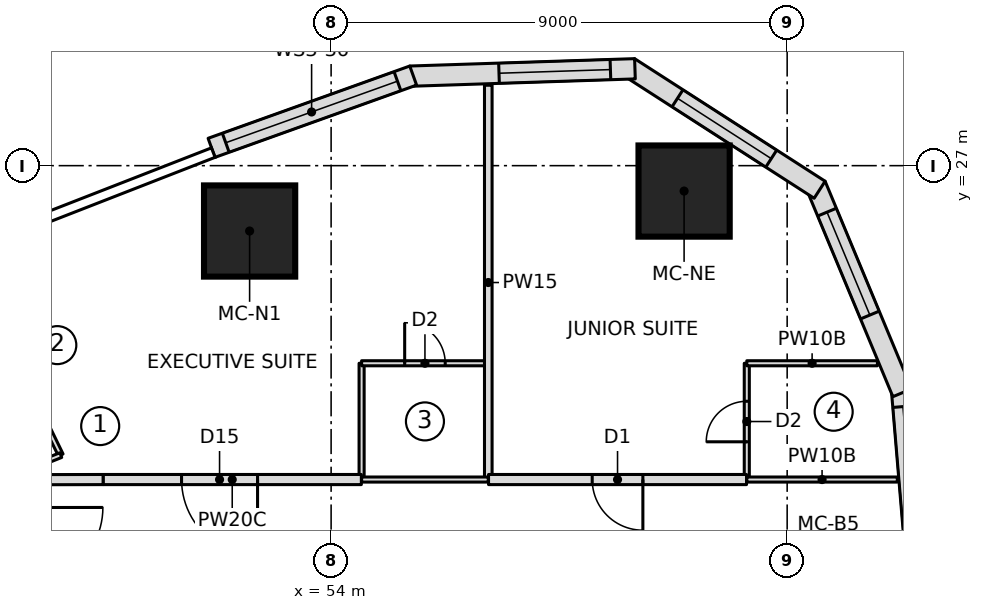
"""IFC4 building model, lengths in metres.
Left out: names, types, materials, properties, quantities, classifications, styles, units other than length and angle.
Written with IfcOpenShell. Run it as: python <this file> out.ifc"""

import sys

from ifc_helpers import new_model, si_unit, direction, frame, frame_2d, origin, origin_2d, place, context, subcontext, project, spatial, polyline, rectangle, outline, extrude, element, fill, save


model = new_model("IFC4")
c1 = context("Model", 3, precision=1e-05, world=origin(), true_north=direction((0.0, 1.0)))
c2 = subcontext(c1, "Body", "Model", "MODEL_VIEW")
j1 = project(units=[si_unit("LENGTHUNIT", "METRE"), si_unit("PLANEANGLEUNIT", "RADIAN")], contexts=[c1])
p1 = place(None, origin())
s1 = spatial("IfcSite", under=j1, at=p1, CompositionType="ELEMENT")
p2 = place(p1, origin())
s2 = spatial("IfcBuilding", under=s1, at=p2, CompositionType="ELEMENT")
p3 = place(p2, frame((0.0, 0.0, 53.8)))
s3 = spatial("IfcBuildingStorey", under=s2, at=p3, CompositionType="ELEMENT", Elevation=53.8)
for number, where, z_axis, x_axis in (
    (1, (60.966, 26.499, 0.0), (0.0, 0.0, 1.0), (1.0, 0.0, 0.0)),
    (2, (52.392, 25.71, 0.0), (0.0, 0.0, 1.0), (1.0, 0.0, 0.0)),
):
    element("IfcColumn", number, at=place(p3, frame(where, z_axis=z_axis, x_axis=x_axis)), inside=s3, PredefinedType="COLUMN", context=c2, shape_type="SweptSolid", body=[
        extrude(rectangle(XDim=1.8, YDim=1.8, at=origin_2d()), origin(), (0.0, 0.0, 1.0), 3.55),
    ])
p4 = place(p3, frame((65.603, 18.455, 0.0), z_axis=(0.0, 0.0, 1.0), x_axis=(-0.083793550906, 0.996483136248, 0.0)))
e3 = element("IfcWall", 3, at=p4, inside=s3, PredefinedType="NOTDEFINED", context=c2, shape_type="SweptSolid", body=[
    extrude(outline(polyline([(-0.002, -0.2), (4.136, -0.2), (4.074, 0.2), (0.002, 0.2), (-0.002, -0.2)])), origin(), (0.0, 0.0, 1.0), 3.25),
])
p5 = place(p4, frame((0.302, 0.0, 0.9)))
e4 = element("IfcOpeningElement", 4, at=p5, cuts=e3, PredefinedType="OPENING", context=c2, shape_type="SweptSolid", body=[
    extrude(rectangle(XDim=3.5, YDim=1.8, at=frame_2d((1.75, 0.9))), frame((0.0, 0.21, 0.0), z_axis=(0.0, -1.0, 0.0), x_axis=(1.0, 0.0, 0.0)), (0.0, 0.0, 1.0), 0.42),
])
p6 = place(p3, frame((65.259, 22.546, 0.0), z_axis=(0.0, 0.0, 1.0), x_axis=(-0.384372042685, 0.923178277908, 0.0)))
e5 = element("IfcWall", 5, at=p6, inside=s3, PredefinedType="NOTDEFINED", context=c2, shape_type="SweptSolid", body=[
    extrude(outline(polyline([(-0.031, -0.2), (4.408, -0.2), (4.283, 0.2), (0.031, 0.2), (-0.031, -0.2)])), origin(), (0.0, 0.0, 1.0), 3.25),
])
p7 = place(p6, frame((1.631, 0.0, 0.6)))
e6 = element("IfcOpeningElement", 6, at=p7, cuts=e5, PredefinedType="OPENING", context=c2, shape_type="SweptSolid", body=[
    extrude(outline(polyline([(0.0, 1.35), (0.084, 1.771), (0.322, 2.128), (0.679, 2.366), (1.1, 2.45), (1.521, 2.366), (1.878, 2.128), (2.116, 1.771), (2.2, 1.35), (2.2, 1.1), (2.116, 0.679), (1.878, 0.322), (1.521, 0.084), (1.1, 0.0), (0.679, 0.084), (0.322, 0.322), (0.084, 0.679), (0.0, 1.1), (0.0, 1.35)])), frame((0.0, 0.21, 0.0), z_axis=(0.0, -1.0, 0.0), x_axis=(1.0, 0.0, 0.0)), (0.0, 0.0, 1.0), 0.42),
])
p8 = place(p3, frame((63.588, 26.558, 0.0), z_axis=(0.0, 0.0, 1.0), x_axis=(-0.840937468718, 0.541132307025, 0.0)))
e7 = element("IfcWall", 7, at=p8, inside=s3, PredefinedType="NOTDEFINED", context=c2, shape_type="SweptSolid", body=[
    extrude(outline(polyline([(-0.062, -0.2), (4.409, -0.2), (4.284, 0.2), (0.062, 0.2), (-0.062, -0.2)])), origin(), (0.0, 0.0, 1.0), 3.25),
])
p9 = place(p8, frame((1.073, 0.0, 0.6)))
e8 = element("IfcOpeningElement", 8, at=p9, cuts=e7, PredefinedType="OPENING", context=c2, shape_type="SweptSolid", body=[
    extrude(outline(polyline([(0.0, 1.35), (0.084, 1.771), (0.322, 2.128), (0.679, 2.366), (1.1, 2.45), (1.521, 2.366), (1.878, 2.128), (2.116, 1.771), (2.2, 1.35), (2.2, 1.1), (2.116, 0.679), (1.878, 0.322), (1.521, 0.084), (1.1, 0.0), (0.679, 0.084), (0.322, 0.322), (0.084, 0.679), (0.0, 1.1), (0.0, 1.35)])), frame((0.0, 0.21, 0.0), z_axis=(0.0, -1.0, 0.0), x_axis=(1.0, 0.0, 0.0)), (0.0, 0.0, 1.0), 0.42),
])
p10 = place(p3, frame((59.934, 28.91, 0.0), z_axis=(0.0, 0.0, 1.0), x_axis=(-0.999463576228, -0.032749958686, 0.0)))
e9 = element("IfcWall", 9, at=p10, inside=s3, PredefinedType="NOTDEFINED", context=c2, shape_type="SweptSolid", body=[
    extrude(outline(polyline([(-0.062, -0.2), (4.378, -0.2), (4.315, 0.2), (0.062, 0.2), (-0.062, -0.2)])), origin(), (0.0, 0.0, 1.0), 3.25),
])
p11 = place(p10, frame((0.422, 0.0, 0.6)))
e10 = element("IfcOpeningElement", 10, at=p11, cuts=e9, PredefinedType="OPENING", context=c2, shape_type="SweptSolid", body=[
    extrude(outline(polyline([(0.0, 1.35), (0.084, 1.771), (0.322, 2.128), (0.679, 2.366), (1.1, 2.45), (1.521, 2.366), (1.878, 2.128), (2.116, 1.771), (2.2, 1.35), (2.2, 1.1), (2.116, 0.679), (1.878, 0.322), (1.521, 0.084), (1.1, 0.0), (0.679, 0.084), (0.322, 0.322), (0.084, 0.679), (0.0, 1.1), (0.0, 1.35)])), frame((0.0, 0.21, 0.0), z_axis=(0.0, -1.0, 0.0), x_axis=(1.0, 0.0, 0.0)), (0.0, 0.0, 1.0), 0.42),
])
p12 = place(p3, frame((55.59, 28.768, 0.0), z_axis=(0.0, 0.0, 1.0), x_axis=(-0.941339752885, -0.337460323057, 0.0)))
e11 = element("IfcWall", 11, at=p12, inside=s3, PredefinedType="NOTDEFINED", context=c2, shape_type="SweptSolid", body=[
    extrude(outline(polyline([(-0.031, -0.2), (4.196, -0.2), (4.196, 0.2), (0.031, 0.2), (-0.031, -0.2)])), origin(), (0.0, 0.0, 1.0), 3.25),
])
p13 = place(p12, frame((0.298, 0.0, 0.9)))
e12 = element("IfcOpeningElement", 12, at=p13, cuts=e11, PredefinedType="OPENING", context=c2, shape_type="SweptSolid", body=[
    extrude(rectangle(XDim=3.6, YDim=1.8, at=frame_2d((1.8, 0.9))), frame((0.0, 0.21, 0.0), z_axis=(0.0, -1.0, 0.0), x_axis=(1.0, 0.0, 0.0)), (0.0, 0.0, 1.0), 0.42),
])
p14 = place(p3, frame((54.602, 20.8, 0.0), z_axis=(0.0, 0.0, 1.0), x_axis=(0.0, 1.0, 0.0)))
e13 = element("IfcWall", 13, at=p14, inside=s3, PredefinedType="PARTITIONING", context=c2, shape_type="SweptSolid", body=[
    extrude(rectangle(XDim=2.3, YDim=0.1, at=frame_2d((1.15, 0.0))), origin(), (0.0, 0.0, 1.0), 3.25),
])
p15 = place(p3, frame((54.602, 23.1, 0.0), z_axis=(0.0, 0.0, 1.0), x_axis=(1.0, 0.0, 0.0)))
e14 = element("IfcWall", 14, at=p15, inside=s3, PredefinedType="PARTITIONING", context=c2, shape_type="SweptSolid", body=[
    extrude(rectangle(XDim=2.5, YDim=0.1, at=frame_2d((1.25, 0.0))), origin(), (0.0, 0.0, 1.0), 3.25),
])
p16 = place(p15, frame((0.85, 0.0, 0.0)))
e15 = element("IfcOpeningElement", 15, at=p16, cuts=e14, PredefinedType="OPENING", context=c2, shape_type="SweptSolid", body=[
    extrude(rectangle(XDim=0.8, YDim=2.1, at=frame_2d((0.4, 1.05))), frame((0.0, 0.06, 0.0), z_axis=(0.0, -1.0, 0.0), x_axis=(1.0, 0.0, 0.0)), (0.0, 0.0, 1.0), 0.12),
])
p17 = place(p3, frame((62.203, 20.8, 0.0), z_axis=(0.0, 0.0, 1.0), x_axis=(0.0, 1.0, 0.0)))
e16 = element("IfcWall", 16, at=p17, inside=s3, PredefinedType="PARTITIONING", context=c2, shape_type="SweptSolid", body=[
    extrude(rectangle(XDim=2.3, YDim=0.1, at=frame_2d((1.15, 0.0))), origin(), (0.0, 0.0, 1.0), 3.25),
])
p18 = place(p17, frame((0.75, 0.0, 0.0)))
e17 = element("IfcOpeningElement", 17, at=p18, cuts=e16, PredefinedType="OPENING", context=c2, shape_type="SweptSolid", body=[
    extrude(rectangle(XDim=0.8, YDim=2.1, at=frame_2d((0.4, 1.05))), frame((0.0, 0.06, 0.0), z_axis=(0.0, -1.0, 0.0), x_axis=(1.0, 0.0, 0.0)), (0.0, 0.0, 1.0), 0.12),
])
p19 = place(p3, frame((62.203, 23.1, 0.0), z_axis=(0.0, 0.0, 1.0), x_axis=(1.0, 0.0, 0.0)))
e18 = element("IfcWall", 18, at=p19, inside=s3, PredefinedType="PARTITIONING", context=c2, shape_type="SweptSolid", body=[
    extrude(rectangle(XDim=2.578, YDim=0.1, at=frame_2d((1.289, 0.0))), origin(), (0.0, 0.0, 1.0), 3.25),
])
p20 = place(p3, frame((57.102, 20.8, 0.0), z_axis=(0.0, 0.0, 1.0), x_axis=(0.0, 1.0, 0.0)))
e19 = element("IfcWall", 19, at=p20, inside=s3, PredefinedType="PARTITIONING", context=c2, shape_type="SweptSolid", body=[
    extrude(rectangle(XDim=7.787, YDim=0.15, at=frame_2d((3.894, 0.0))), origin(), (0.0, 0.0, 1.0), 3.25),
])
p21 = place(p3, frame((47.655, 23.361, 0.0), z_axis=(0.0, 0.0, 1.0), x_axis=(0.438171240168, -0.898891519756, 0.0)))
e20 = element("IfcWall", 20, at=p21, inside=s3, PredefinedType="PARTITIONING", context=c2, shape_type="SweptSolid", body=[
    extrude(rectangle(XDim=2.306, YDim=0.1, at=frame_2d((1.153, 0.0))), origin(), (0.0, 0.0, 1.0), 3.25),
])
p22 = place(p3, frame((48.665, 21.288, 0.0), z_axis=(0.0, 0.0, 1.0), x_axis=(-0.928288495333, -0.371860819975, 0.0)))
e21 = element("IfcWall", 21, at=p22, inside=s3, PredefinedType="PARTITIONING", context=c2, shape_type="SweptSolid", body=[
    extrude(rectangle(XDim=2.507, YDim=0.1, at=frame_2d((1.253, 0.0))), origin(), (0.0, 0.0, 1.0), 3.25),
])
p23 = place(p22, frame((1.25, 0.0, 0.0)))
e22 = element("IfcOpeningElement", 22, at=p23, cuts=e21, PredefinedType="OPENING", context=c2, shape_type="SweptSolid", body=[
    extrude(rectangle(XDim=0.8, YDim=2.1, at=frame_2d((0.4, 1.05))), frame((0.0, 0.06, 0.0), z_axis=(0.0, -1.0, 0.0), x_axis=(1.0, 0.0, 0.0)), (0.0, 0.0, 1.0), 0.12),
])
p24 = place(p3, frame((54.597, 20.805, 0.0), z_axis=(0.0, 0.0, 1.0), x_axis=(-1.0, 0.0, 0.0)))
e23 = element("IfcWall", 23, at=p24, inside=s3, PredefinedType="PARTITIONING", context=c2, shape_type="SweptSolid", body=[
    extrude(rectangle(XDim=5.097, YDim=0.2, at=frame_2d((2.548, 0.0))), origin(), (0.0, 0.0, 1.0), 3.25),
])
p25 = place(p24, frame((2.048, 0.0, 0.0)))
e24 = element("IfcOpeningElement", 24, at=p25, cuts=e23, PredefinedType="OPENING", context=c2, shape_type="SweptSolid", body=[
    extrude(rectangle(XDim=1.5, YDim=2.1, at=frame_2d((0.75, 1.05))), frame((0.0, 0.11, 0.0), z_axis=(0.0, -1.0, 0.0), x_axis=(1.0, 0.0, 0.0)), (0.0, 0.0, 1.0), 0.22),
])
p26 = place(p3, frame((62.198, 20.805, 0.0), z_axis=(0.0, 0.0, 1.0), x_axis=(-1.0, 0.0, 0.0)))
e25 = element("IfcWall", 25, at=p26, inside=s3, PredefinedType="PARTITIONING", context=c2, shape_type="SweptSolid", body=[
    extrude(rectangle(XDim=5.092, YDim=0.2, at=frame_2d((2.546, 0.0))), origin(), (0.0, 0.0, 1.0), 3.25),
])
p27 = place(p26, frame((2.046, 0.0, 0.0)))
e26 = element("IfcOpeningElement", 26, at=p27, cuts=e25, PredefinedType="OPENING", context=c2, shape_type="SweptSolid", body=[
    extrude(rectangle(XDim=1.0, YDim=2.1, at=frame_2d((0.5, 1.05))), frame((0.0, 0.11, 0.0), z_axis=(0.0, -1.0, 0.0), x_axis=(1.0, 0.0, 0.0)), (0.0, 0.0, 1.0), 0.22),
])
p28 = place(p3, frame((57.102, 20.805, 0.0), z_axis=(0.0, 0.0, 1.0), x_axis=(-1.0, 0.0, 0.0)))
e27 = element("IfcWall", 27, at=p28, inside=s3, PredefinedType="PARTITIONING", context=c2, shape_type="SweptSolid", body=[
    extrude(rectangle(XDim=2.5, YDim=0.1, at=frame_2d((1.25, 0.0))), origin(), (0.0, 0.0, 1.0), 3.25),
])
p29 = place(p3, frame((65.175, 20.805, 0.0), z_axis=(0.0, 0.0, 1.0), x_axis=(-1.0, 0.0, 0.0)))
e28 = element("IfcWall", 28, at=p29, inside=s3, PredefinedType="PARTITIONING", context=c2, shape_type="SweptSolid", body=[
    extrude(rectangle(XDim=2.971, YDim=0.1, at=frame_2d((1.486, 0.0))), origin(), (0.0, 0.0, 1.0), 3.25),
])
p30 = place(p3, frame((49.5, 20.805, 0.0), z_axis=(0.0, 0.0, 1.0), x_axis=(-0.999998104399, -0.001947099992, 0.0)))
e29 = element("IfcWall", 29, at=p30, inside=s3, PredefinedType="PARTITIONING", context=c2, shape_type="SweptSolid", body=[
    extrude(rectangle(XDim=1.505, YDim=0.2, at=frame_2d((0.752, 0.0))), origin(), (0.0, 0.0, 1.0), 3.25),
])
p31 = place(p5, origin())
e30 = element("IfcWindow", 30, at=p31, inside=s3, PartitioningType="SINGLE_PANEL", PredefinedType="WINDOW", context=c2, shape_type="SweptSolid", body=[
    extrude(rectangle(XDim=3.5, YDim=1.8, at=frame_2d((1.75, 0.9))), frame((0.0, 0.17, 0.0), z_axis=(0.0, -1.0, 0.0), x_axis=(1.0, 0.0, 0.0)), (0.0, 0.0, 1.0), 0.06),
])
fill(e4, e30)
p32 = place(p7, origin())
e31 = element("IfcWindow", 31, at=p32, inside=s3, PartitioningType="SINGLE_PANEL", PredefinedType="WINDOW", context=c2, shape_type="SweptSolid", body=[
    extrude(outline(polyline([(0.0, 1.35), (0.084, 1.771), (0.322, 2.128), (0.679, 2.366), (1.1, 2.45), (1.521, 2.366), (1.878, 2.128), (2.116, 1.771), (2.2, 1.35), (2.2, 1.1), (2.116, 0.679), (1.878, 0.322), (1.521, 0.084), (1.1, 0.0), (0.679, 0.084), (0.322, 0.322), (0.084, 0.679), (0.0, 1.1), (0.0, 1.35)])), frame((0.0, 0.17, 0.0), z_axis=(0.0, -1.0, 0.0), x_axis=(1.0, 0.0, 0.0)), (0.0, 0.0, 1.0), 0.06),
])
fill(e6, e31)
p33 = place(p9, origin())
e32 = element("IfcWindow", 32, at=p33, inside=s3, PartitioningType="SINGLE_PANEL", PredefinedType="WINDOW", context=c2, shape_type="SweptSolid", body=[
    extrude(outline(polyline([(0.0, 1.35), (0.084, 1.771), (0.322, 2.128), (0.679, 2.366), (1.1, 2.45), (1.521, 2.366), (1.878, 2.128), (2.116, 1.771), (2.2, 1.35), (2.2, 1.1), (2.116, 0.679), (1.878, 0.322), (1.521, 0.084), (1.1, 0.0), (0.679, 0.084), (0.322, 0.322), (0.084, 0.679), (0.0, 1.1), (0.0, 1.35)])), frame((0.0, 0.17, 0.0), z_axis=(0.0, -1.0, 0.0), x_axis=(1.0, 0.0, 0.0)), (0.0, 0.0, 1.0), 0.06),
])
fill(e8, e32)
p34 = place(p11, origin())
e33 = element("IfcWindow", 33, at=p34, inside=s3, PartitioningType="SINGLE_PANEL", PredefinedType="WINDOW", context=c2, shape_type="SweptSolid", body=[
    extrude(outline(polyline([(0.0, 1.35), (0.084, 1.771), (0.322, 2.128), (0.679, 2.366), (1.1, 2.45), (1.521, 2.366), (1.878, 2.128), (2.116, 1.771), (2.2, 1.35), (2.2, 1.1), (2.116, 0.679), (1.878, 0.322), (1.521, 0.084), (1.1, 0.0), (0.679, 0.084), (0.322, 0.322), (0.084, 0.679), (0.0, 1.1), (0.0, 1.35)])), frame((0.0, 0.17, 0.0), z_axis=(0.0, -1.0, 0.0), x_axis=(1.0, 0.0, 0.0)), (0.0, 0.0, 1.0), 0.06),
])
fill(e10, e33)
p35 = place(p13, origin())
e34 = element("IfcWindow", 34, at=p35, inside=s3, PartitioningType="SINGLE_PANEL", PredefinedType="WINDOW", context=c2, shape_type="SweptSolid", body=[
    extrude(rectangle(XDim=3.6, YDim=1.8, at=frame_2d((1.8, 0.9))), frame((0.0, 0.17, 0.0), z_axis=(0.0, -1.0, 0.0), x_axis=(1.0, 0.0, 0.0)), (0.0, 0.0, 1.0), 0.06),
])
fill(e12, e34)
p36 = place(p16, origin())
e35 = element("IfcDoor", 35, at=p36, inside=s3, OperationType="SINGLE_SWING_LEFT", PredefinedType="DOOR", context=c2, shape_type="SweptSolid", body=[
    extrude(rectangle(XDim=0.8, YDim=2.1, at=frame_2d((0.4, 1.05))), frame((0.0, 0.025, 0.0), z_axis=(0.0, -1.0, 0.0), x_axis=(1.0, 0.0, 0.0)), (0.0, 0.0, 1.0), 0.05),
])
fill(e15, e35)
p37 = place(p18, origin())
e36 = element("IfcDoor", 36, at=p37, inside=s3, OperationType="SINGLE_SWING_LEFT", PredefinedType="DOOR", context=c2, shape_type="SweptSolid", body=[
    extrude(rectangle(XDim=0.8, YDim=2.1, at=frame_2d((0.4, 1.05))), frame((0.0, 0.025, 0.0), z_axis=(0.0, -1.0, 0.0), x_axis=(1.0, 0.0, 0.0)), (0.0, 0.0, 1.0), 0.05),
])
fill(e17, e36)
p38 = place(p25, origin())
e37 = element("IfcDoor", 37, at=p38, inside=s3, OperationType="DOUBLE_DOOR_SINGLE_SWING", PredefinedType="DOOR", context=c2, shape_type="SweptSolid", body=[
    extrude(rectangle(XDim=1.5, YDim=2.1, at=frame_2d((0.75, 1.05))), frame((0.0, 0.025, 0.0), z_axis=(0.0, -1.0, 0.0), x_axis=(1.0, 0.0, 0.0)), (0.0, 0.0, 1.0), 0.05),
])
fill(e24, e37)
p39 = place(p27, origin())
e38 = element("IfcDoor", 38, at=p39, inside=s3, OperationType="SINGLE_SWING_LEFT", PredefinedType="DOOR", context=c2, shape_type="SweptSolid", body=[
    extrude(rectangle(XDim=1.0, YDim=2.1, at=frame_2d((0.5, 1.05))), frame((0.0, 0.025, 0.0), z_axis=(0.0, -1.0, 0.0), x_axis=(1.0, 0.0, 0.0)), (0.0, 0.0, 1.0), 0.05),
])
fill(e26, e38)
save(model, sys.argv[1])
